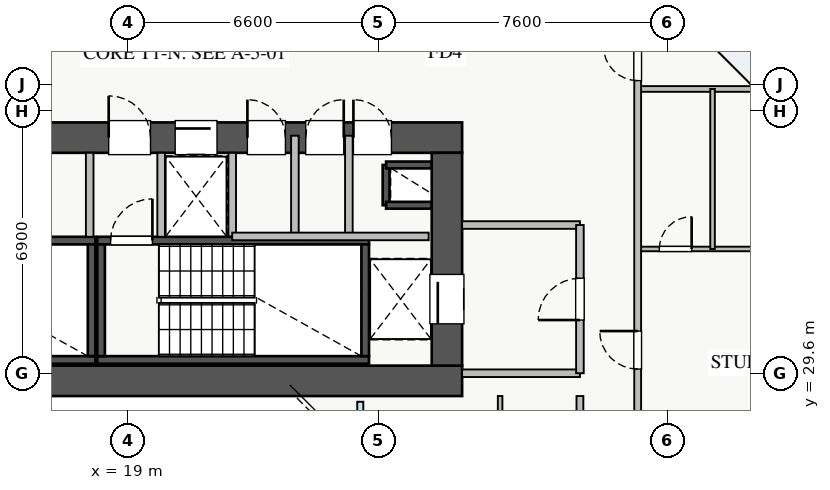
"""IFC4 building model, lengths in metres.
Left out: names, types, materials, properties, quantities, classifications, styles, units other than length and angle.
Written with IfcOpenShell. Run it as: python <this file> out.ifc"""

import sys

from ifc_helpers import new_model, si_unit, direction, frame, frame_2d, origin, place, context, subcontext, project, spatial, rectangle, extrude, source, transform, mapped, element, fill, save


model = new_model("IFC4")
c1 = context("Model", 3, precision=1e-05, world=origin(), true_north=direction((0.0, 1.0)))
c2 = subcontext(c1, "Body", "Model", "MODEL_VIEW")
j1 = project(units=[si_unit("LENGTHUNIT", "METRE"), si_unit("PLANEANGLEUNIT", "RADIAN")], contexts=[c1])
p1 = place(None, origin())
s1 = spatial("IfcSite", under=j1, at=p1, CompositionType="ELEMENT")
p2 = place(p1, origin())
s2 = spatial("IfcBuilding", under=s1, at=p2, CompositionType="ELEMENT")
p3 = place(p2, frame((0.0, 0.0, 82.75)))
s3 = spatial("IfcBuildingStorey", under=s2, at=p3, CompositionType="ELEMENT", Elevation=82.75)
p4 = place(p3, frame((25.8, 34.02, 0.0), z_axis=(0.0, 0.0, 1.0), x_axis=(0.0, 1.0, 0.0)))
e1 = element("IfcWall", 1, at=p4, inside=s3, PredefinedType="SHEAR", context=c2, shape_type="SweptSolid", body=[
    extrude(rectangle(XDim=1.06, YDim=0.18, at=frame_2d((0.53, 0.0))), origin(), (0.0, 0.0, 1.0), 3.07),
])
for number, where, z_axis, x_axis in (
    (2, (25.8, 35.08, 0.0), (0.0, 0.0, 1.0), (1.0, 0.0, 0.0)),
    (3, (25.8, 34.02, 0.0), (0.0, 0.0, 1.0), (1.0, 0.0, 0.0)),
):
    element("IfcWall", number, at=place(p3, frame(where, z_axis=z_axis, x_axis=x_axis)), inside=s3, PredefinedType="SHEAR", context=c2, shape_type="SweptSolid", body=[
        extrude(rectangle(XDim=1.2, YDim=0.18, at=frame_2d((0.6, 0.0))), origin(), (0.0, 0.0, 1.0), 3.07),
    ])
p5 = place(p3, frame((19.88, 33.2, 0.0), z_axis=(0.0, 0.0, 1.0), x_axis=(1.0, 0.0, 0.0)))
e4 = element("IfcWall", 4, at=p5, inside=s3, PredefinedType="SHEAR", context=c2, shape_type="SweptSolid", body=[
    extrude(rectangle(XDim=1.87, YDim=0.18, at=frame_2d((0.935, 0.0))), origin(), (0.0, 0.0, 1.0), 3.07),
])
p6 = place(p3, frame((11.0, 29.95, 0.0), z_axis=(0.0, 0.0, 1.0), x_axis=(1.0, 0.0, 0.0)))
e5 = element("IfcWall", 5, at=p6, inside=s3, PredefinedType="SHEAR", context=c2, shape_type="SweptSolid", body=[
    extrude(rectangle(XDim=7.15, YDim=0.2, at=frame_2d((3.575, 0.0))), origin(), (0.0, 0.0, 1.0), 3.25),
])
p7 = place(p3, frame((11.0, 33.09, 0.0), z_axis=(0.0, 0.0, 1.0), x_axis=(1.0, 0.0, 0.0)))
e6 = element("IfcWall", 6, at=p7, inside=s3, PredefinedType="SHEAR", context=c2, shape_type="SweptSolid", body=[
    extrude(rectangle(XDim=7.15, YDim=0.2, at=frame_2d((3.575, 0.0))), origin(), (0.0, 0.0, 1.0), 3.25),
])
p8 = place(p7, frame((0.35, 0.0, 0.0)))
e7 = element("IfcOpeningElement", 7, at=p8, cuts=e6, PredefinedType="OPENING", context=c2, shape_type="SweptSolid", body=[
    extrude(rectangle(XDim=1.1, YDim=2.05, at=frame_2d((0.55, 1.025))), frame((0.0, 0.11, 0.0), z_axis=(0.0, -1.0, 0.0), x_axis=(1.0, 0.0, 0.0)), (0.0, 0.0, 1.0), 0.22),
])
p9 = place(p3, frame((18.05, 30.05, 0.0), z_axis=(0.0, 0.0, 1.0), x_axis=(0.0, 1.0, 0.0)))
e8 = element("IfcWall", 8, at=p9, inside=s3, PredefinedType="SHEAR", context=c2, shape_type="SweptSolid", body=[
    extrude(rectangle(XDim=2.94, YDim=0.2, at=frame_2d((1.47, 0.0))), origin(), (0.0, 0.0, 1.0), 3.25),
])
p10 = place(p3, frame((18.2, 29.95, 0.0), z_axis=(0.0, 0.0, 1.0), x_axis=(1.0, 0.0, 0.0)))
e9 = element("IfcWall", 9, at=p10, inside=s3, PredefinedType="SHEAR", context=c2, shape_type="SweptSolid", body=[
    extrude(rectangle(XDim=7.15, YDim=0.2, at=frame_2d((3.575, 0.0))), origin(), (0.0, 0.0, 1.0), 3.25),
])
p11 = place(p3, frame((18.2, 33.09, 0.0), z_axis=(0.0, 0.0, 1.0), x_axis=(1.0, 0.0, 0.0)))
e10 = element("IfcWall", 10, at=p11, inside=s3, PredefinedType="SHEAR", context=c2, shape_type="SweptSolid", body=[
    extrude(rectangle(XDim=7.15, YDim=0.2, at=frame_2d((3.575, 0.0))), origin(), (0.0, 0.0, 1.0), 3.25),
])
p12 = place(p11, frame((0.35, 0.0, 0.0)))
e11 = element("IfcOpeningElement", 11, at=p12, cuts=e10, PredefinedType="OPENING", context=c2, shape_type="SweptSolid", body=[
    extrude(rectangle(XDim=1.1, YDim=2.05, at=frame_2d((0.55, 1.025))), frame((0.0, 0.11, 0.0), z_axis=(0.0, -1.0, 0.0), x_axis=(1.0, 0.0, 0.0)), (0.0, 0.0, 1.0), 0.22),
])
for number, where, z_axis, x_axis in (
    (12, (18.3, 30.05, 0.0), (0.0, 0.0, 1.0), (0.0, 1.0, 0.0)),
    (13, (25.25, 30.05, 0.0), (0.0, 0.0, 1.0), (0.0, 1.0, 0.0)),
):
    element("IfcWall", number, at=place(p3, frame(where, z_axis=z_axis, x_axis=x_axis)), inside=s3, PredefinedType="SHEAR", context=c2, shape_type="SweptSolid", body=[
        extrude(rectangle(XDim=2.94, YDim=0.2, at=frame_2d((1.47, 0.0))), origin(), (0.0, 0.0, 1.0), 3.25),
    ])
p13 = place(p3, frame((10.2, 29.4, 0.0), z_axis=(0.0, 0.0, 1.0), x_axis=(1.0, 0.0, 0.0)))
e14 = element("IfcWall", 14, at=p13, inside=s3, PredefinedType="SHEAR", context=c2, shape_type="SweptSolid", body=[
    extrude(rectangle(XDim=17.6, YDim=0.8, at=frame_2d((8.8, 0.0))), origin(), (0.0, 0.0, 1.0), 3.25),
])
p14 = place(p3, frame((10.2, 35.8, 0.0), z_axis=(0.0, 0.0, 1.0), x_axis=(1.0, 0.0, 0.0)))
e15 = element("IfcWall", 15, at=p14, inside=s3, PredefinedType="SHEAR", context=c2, shape_type="SweptSolid", body=[
    extrude(rectangle(XDim=17.6, YDim=0.8, at=frame_2d((8.8, 0.0))), origin(), (0.0, 0.0, 1.0), 3.25),
])
p15 = place(p14, frame((1.15, 0.0, 0.0)))
e16 = element("IfcOpeningElement", 16, at=p15, cuts=e15, PredefinedType="OPENING", context=c2, shape_type="SweptSolid", body=[
    extrude(rectangle(XDim=1.1, YDim=2.05, at=frame_2d((0.55, 1.025))), frame((0.0, 0.41, 0.0), z_axis=(0.0, -1.0, 0.0), x_axis=(1.0, 0.0, 0.0)), (0.0, 0.0, 1.0), 0.82),
])
p16 = place(p14, frame((8.3, 0.0, 0.0)))
e17 = element("IfcOpeningElement", 17, at=p16, cuts=e15, PredefinedType="OPENING", context=c2, shape_type="SweptSolid", body=[
    extrude(rectangle(XDim=1.1, YDim=2.05, at=frame_2d((0.55, 1.025))), frame((0.0, 0.41, 0.0), z_axis=(0.0, -1.0, 0.0), x_axis=(1.0, 0.0, 0.0)), (0.0, 0.0, 1.0), 0.82),
])
p17 = place(p14, frame((10.05, 0.0, 0.0)))
e18 = element("IfcOpeningElement", 18, at=p17, cuts=e15, PredefinedType="OPENING", context=c2, shape_type="SweptSolid", body=[
    extrude(rectangle(XDim=1.1, YDim=2.05, at=frame_2d((0.55, 1.025))), frame((0.0, 0.41, 0.0), z_axis=(0.0, -1.0, 0.0), x_axis=(1.0, 0.0, 0.0)), (0.0, 0.0, 1.0), 0.82),
])
p18 = place(p14, frame((14.74, 0.0, 0.0)))
e19 = element("IfcOpeningElement", 19, at=p18, cuts=e15, PredefinedType="OPENING", context=c2, shape_type="SweptSolid", body=[
    extrude(rectangle(XDim=1.0, YDim=2.05, at=frame_2d((0.5, 1.025))), frame((0.0, 0.41, 0.0), z_axis=(0.0, -1.0, 0.0), x_axis=(1.0, 0.0, 0.0)), (0.0, 0.0, 1.0), 0.82),
])
p19 = place(p14, frame((11.95, 0.0, 0.0)))
e20 = element("IfcOpeningElement", 20, at=p19, cuts=e15, PredefinedType="OPENING", context=c2, shape_type="SweptSolid", body=[
    extrude(rectangle(XDim=1.0, YDim=2.05, at=frame_2d((0.5, 1.025))), frame((0.0, 0.41, 0.0), z_axis=(0.0, -1.0, 0.0), x_axis=(1.0, 0.0, 0.0)), (0.0, 0.0, 1.0), 0.82),
])
p20 = place(p14, frame((13.485, 0.0, 0.0)))
e21 = element("IfcOpeningElement", 21, at=p20, cuts=e15, PredefinedType="OPENING", context=c2, shape_type="SweptSolid", body=[
    extrude(rectangle(XDim=1.0, YDim=2.05, at=frame_2d((0.5, 1.025))), frame((0.0, 0.41, 0.0), z_axis=(0.0, -1.0, 0.0), x_axis=(1.0, 0.0, 0.0)), (0.0, 0.0, 1.0), 0.82),
])
p21 = place(p3, frame((27.4, 29.8, 0.0), z_axis=(0.0, 0.0, 1.0), x_axis=(0.0, 1.0, 0.0)))
e22 = element("IfcWall", 22, at=p21, inside=s3, PredefinedType="SHEAR", context=c2, shape_type="SweptSolid", body=[
    extrude(rectangle(XDim=5.6, YDim=0.8, at=frame_2d((2.8, 0.0))), origin(), (0.0, 0.0, 1.0), 3.25),
])
p22 = place(p21, frame((1.1, 0.0, 0.0)))
e23 = element("IfcOpeningElement", 23, at=p22, cuts=e22, PredefinedType="OPENING", context=c2, shape_type="SweptSolid", body=[
    extrude(rectangle(XDim=1.3, YDim=2.05, at=frame_2d((0.65, 1.025))), frame((0.0, 0.41, 0.0), z_axis=(0.0, -1.0, 0.0), x_axis=(1.0, 0.0, 0.0)), (0.0, 0.0, 1.0), 0.82),
])
for number, where, z_axis, x_axis in (
    (24, (27.8, 29.6, 0.0), (0.0, 0.0, 1.0), (1.0, 0.0, 0.0)),
    (25, (27.8, 33.5, 0.0), (0.0, 0.0, 1.0), (1.0, 0.0, 0.0)),
):
    element("IfcWall", number, at=place(p3, frame(where, z_axis=z_axis, x_axis=x_axis)), inside=s3, PredefinedType="PARTITIONING", context=c2, shape_type="SweptSolid", body=[
        extrude(rectangle(XDim=3.1, YDim=0.2, at=frame_2d((1.55, 0.0))), origin(), (0.0, 0.0, 1.0), 3.07),
    ])
p23 = place(p3, frame((30.9, 29.6, 0.0), z_axis=(0.0, 0.0, 1.0), x_axis=(0.0, 1.0, 0.0)))
e26 = element("IfcWall", 26, at=p23, inside=s3, PredefinedType="PARTITIONING", context=c2, shape_type="SweptSolid", body=[
    extrude(rectangle(XDim=3.9, YDim=0.2, at=frame_2d((1.95, 0.0))), origin(), (0.0, 0.0, 1.0), 3.07),
])
p24 = place(p23, frame((1.4, 0.0, 0.0)))
e27 = element("IfcOpeningElement", 27, at=p24, cuts=e26, PredefinedType="OPENING", context=c2, shape_type="SweptSolid", body=[
    extrude(rectangle(XDim=1.1, YDim=2.05, at=frame_2d((0.55, 1.025))), frame((0.0, 0.11, 0.0), z_axis=(0.0, -1.0, 0.0), x_axis=(1.0, 0.0, 0.0)), (0.0, 0.0, 1.0), 0.22),
])
for number, where, z_axis, x_axis in (
    (28, (18.0, 33.19, 0.0), (0.0, 0.0, 1.0), (0.0, 1.0, 0.0)),
    (29, (19.88, 33.19, 0.0), (0.0, 0.0, 1.0), (0.0, 1.0, 0.0)),
):
    element("IfcWall", number, at=place(p3, frame(where, z_axis=z_axis, x_axis=x_axis)), inside=s3, PredefinedType="PARTITIONING", context=c2, shape_type="SweptSolid", body=[
        extrude(rectangle(XDim=2.21, YDim=0.2, at=frame_2d((1.105, 0.0))), origin(), (0.0, 0.0, 1.0), 3.07),
    ])
p25 = place(p3, frame((24.82, 33.2, 0.0), z_axis=(0.0, 0.0, 1.0), x_axis=(0.0, 1.0, 0.0)))
e30 = element("IfcWall", 30, at=p25, inside=s3, PredefinedType="PARTITIONING", context=c2, shape_type="SweptSolid", body=[
    extrude(rectangle(XDim=2.65, YDim=0.2, at=frame_2d((1.325, 0.0))), origin(), (0.0, 0.0, 1.0), 3.07),
])
p26 = place(p3, frame((21.75, 33.2, 0.0), z_axis=(0.0, 0.0, 1.0), x_axis=(0.0, 1.0, 0.0)))
e31 = element("IfcWall", 31, at=p26, inside=s3, PredefinedType="PARTITIONING", context=c2, shape_type="SweptSolid", body=[
    extrude(rectangle(XDim=2.2, YDim=0.2, at=frame_2d((1.1, 0.0))), origin(), (0.0, 0.0, 1.0), 3.07),
])
p27 = place(p3, frame((23.4, 33.2, 0.0), z_axis=(0.0, 0.0, 1.0), x_axis=(0.0, 1.0, 0.0)))
e32 = element("IfcWall", 32, at=p27, inside=s3, PredefinedType="PARTITIONING", context=c2, shape_type="SweptSolid", body=[
    extrude(rectangle(XDim=2.65, YDim=0.2, at=frame_2d((1.325, 0.0))), origin(), (0.0, 0.0, 1.0), 3.07),
])
p28 = place(p3, frame((21.75, 33.2, 0.0), z_axis=(0.0, 0.0, 1.0), x_axis=(1.0, 0.0, 0.0)))
e33 = element("IfcWall", 33, at=p28, inside=s3, PredefinedType="PARTITIONING", context=c2, shape_type="SweptSolid", body=[
    extrude(rectangle(XDim=5.17, YDim=0.2, at=frame_2d((2.585, 0.0))), origin(), (0.0, 0.0, 1.0), 3.07),
])
p29 = place(p3, frame((32.42, 37.08, 0.0), z_axis=(0.0, 0.0, 1.0), x_axis=(1.0, 0.0, 0.0)))
e34 = element("IfcWall", 34, at=p29, inside=s3, PredefinedType="PARTITIONING", context=c2, shape_type="SweptSolid", body=[
    extrude(rectangle(XDim=5.33, YDim=0.15, at=frame_2d((2.665, 0.0))), origin(), (0.0, 0.0, 1.0), 3.07),
])
p30 = place(p3, frame((32.42, 32.87, 0.0), z_axis=(0.0, 0.0, 1.0), x_axis=(1.0, 0.0, 0.0)))
e35 = element("IfcWall", 35, at=p30, inside=s3, PredefinedType="PLUMBINGWALL", context=c2, shape_type="SweptSolid", body=[
    extrude(rectangle(XDim=5.33, YDim=0.12, at=frame_2d((2.665, 0.0))), origin(), (0.0, 0.0, 1.0), 3.07),
])
p31 = place(p30, frame((0.57, 0.0, 0.0)))
e36 = element("IfcOpeningElement", 36, at=p31, cuts=e35, PredefinedType="OPENING", context=c2, shape_type="SweptSolid", body=[
    extrude(rectangle(XDim=0.85, YDim=2.05, at=frame_2d((0.425, 1.025))), frame((0.0, 0.07, 0.0), z_axis=(0.0, -1.0, 0.0), x_axis=(1.0, 0.0, 0.0)), (0.0, 0.0, 1.0), 0.14),
])
p32 = place(p30, frame((3.19, 0.0, 0.0)))
e37 = element("IfcOpeningElement", 37, at=p32, cuts=e35, PredefinedType="OPENING", context=c2, shape_type="SweptSolid", body=[
    extrude(rectangle(XDim=0.9, YDim=2.05, at=frame_2d((0.45, 1.025))), frame((0.0, 0.07, 0.0), z_axis=(0.0, -1.0, 0.0), x_axis=(1.0, 0.0, 0.0)), (0.0, 0.0, 1.0), 0.14),
])
p33 = place(p3, frame((34.39, 32.87, 0.0), z_axis=(0.0, 0.0, 1.0), x_axis=(0.0, 1.0, 0.0)))
e38 = element("IfcWall", 38, at=p33, inside=s3, PredefinedType="PLUMBINGWALL", context=c2, shape_type="SweptSolid", body=[
    extrude(rectangle(XDim=4.21, YDim=0.12, at=frame_2d((2.105, 0.0))), origin(), (0.0, 0.0, 1.0), 3.07),
])
p34 = place(p3, frame((32.42, 7.21, 0.0), z_axis=(0.0, 0.0, 1.0), x_axis=(0.0, 1.0, 0.0)))
e39 = element("IfcWall", 39, at=p34, inside=s3, PredefinedType="PARTITIONING", context=c2, shape_type="SweptSolid", body=[
    extrude(rectangle(XDim=31.23, YDim=0.18, at=frame_2d((15.615, 0.0))), origin(), (0.0, 0.0, 1.0), 2.865),
])
p35 = place(p34, frame((30.09, 0.0, 0.0)))
e40 = element("IfcOpeningElement", 40, at=p35, cuts=e39, PredefinedType="OPENING", context=c2, shape_type="SweptSolid", body=[
    extrude(rectangle(XDim=0.9, YDim=2.05, at=frame_2d((0.45, 1.025))), frame((0.0, 0.1, 0.0), z_axis=(0.0, -1.0, 0.0), x_axis=(1.0, 0.0, 0.0)), (0.0, 0.0, 1.0), 0.2),
])
p36 = place(p34, frame((0.415, 0.0, 0.0)))
e41 = element("IfcOpeningElement", 41, at=p36, cuts=e39, PredefinedType="OPENING", context=c2, shape_type="SweptSolid", body=[
    extrude(rectangle(XDim=0.9, YDim=2.05, at=frame_2d((0.45, 1.025))), frame((0.0, 0.1, 0.0), z_axis=(0.0, -1.0, 0.0), x_axis=(1.0, 0.0, 0.0)), (0.0, 0.0, 1.0), 0.2),
])
p37 = place(p34, frame((5.675, 0.0, 0.0)))
e42 = element("IfcOpeningElement", 42, at=p37, cuts=e39, PredefinedType="OPENING", context=c2, shape_type="SweptSolid", body=[
    extrude(rectangle(XDim=1.0, YDim=2.05, at=frame_2d((0.5, 1.025))), frame((0.0, 0.1, 0.0), z_axis=(0.0, -1.0, 0.0), x_axis=(1.0, 0.0, 0.0)), (0.0, 0.0, 1.0), 0.2),
])
p38 = place(p34, frame((12.575, 0.0, 0.0)))
e43 = element("IfcOpeningElement", 43, at=p38, cuts=e39, PredefinedType="OPENING", context=c2, shape_type="SweptSolid", body=[
    extrude(rectangle(XDim=1.0, YDim=2.05, at=frame_2d((0.5, 1.025))), frame((0.0, 0.1, 0.0), z_axis=(0.0, -1.0, 0.0), x_axis=(1.0, 0.0, 0.0)), (0.0, 0.0, 1.0), 0.2),
])
p39 = place(p34, frame((22.5, 0.0, 0.0)))
e44 = element("IfcOpeningElement", 44, at=p39, cuts=e39, PredefinedType="OPENING", context=c2, shape_type="SweptSolid", body=[
    extrude(rectangle(XDim=1.0, YDim=2.05, at=frame_2d((0.5, 1.025))), frame((0.0, 0.1, 0.0), z_axis=(0.0, -1.0, 0.0), x_axis=(1.0, 0.0, 0.0)), (0.0, 0.0, 1.0), 0.2),
])
p40 = place(p3, frame((28.8, 26.39, 0.0), z_axis=(0.0, 0.0, 1.0), x_axis=(0.0, 1.0, 0.0)))
e45 = element("IfcWall", 45, at=p40, inside=s3, PredefinedType="PLUMBINGWALL", context=c2, shape_type="SweptSolid", body=[
    extrude(rectangle(XDim=2.61, YDim=0.12, at=frame_2d((1.305, 0.0))), origin(), (0.0, 0.0, 1.0), 3.07),
])
p41 = place(p3, frame((30.9, 17.0, 0.0), z_axis=(0.0, 0.0, 1.0), x_axis=(0.0, 1.0, 0.0)))
e46 = element("IfcWall", 46, at=p41, inside=s3, PredefinedType="PARTITIONING", context=c2, shape_type="SweptSolid", body=[
    extrude(rectangle(XDim=12.0, YDim=0.18, at=frame_2d((6.0, 0.0))), origin(), (0.0, 0.0, 1.0), 3.07),
])
p42 = place(p41, frame((1.02, 0.0, 0.0)))
e47 = element("IfcOpeningElement", 47, at=p42, cuts=e46, PredefinedType="OPENING", context=c2, shape_type="SweptSolid", body=[
    extrude(rectangle(XDim=1.0, YDim=2.05, at=frame_2d((0.5, 1.025))), frame((0.0, 0.1, 0.0), z_axis=(0.0, -1.0, 0.0), x_axis=(1.0, 0.0, 0.0)), (0.0, 0.0, 1.0), 0.2),
])
p43 = place(p41, frame((7.17, 0.0, 0.0)))
e48 = element("IfcOpeningElement", 48, at=p43, cuts=e46, PredefinedType="OPENING", context=c2, shape_type="SweptSolid", body=[
    extrude(rectangle(XDim=1.0, YDim=2.05, at=frame_2d((0.5, 1.025))), frame((0.0, 0.1, 0.0), z_axis=(0.0, -1.0, 0.0), x_axis=(1.0, 0.0, 0.0)), (0.0, 0.0, 1.0), 0.2),
])
m1 = source(origin(), c2, "Body", "SweptSolid", [
    extrude(rectangle(XDim=1.3, YDim=2.05, at=frame_2d((0.65, 1.025))), frame((0.0, 0.025, 0.0), z_axis=(0.0, -1.0, 0.0), x_axis=(1.0, 0.0, 0.0)), (0.0, 0.0, 1.0), 0.05),
])
p44 = place(p22, origin())
e49 = element("IfcDoor", 49, at=p44, inside=s3, OperationType="SLIDING_TO_LEFT", PredefinedType="DOOR", context=c2, shape_type="MappedRepresentation", body=[
    mapped(m1, transform((0.0, 0.0, 0.0), x_axis=(1.0, 0.0, 0.0), y_axis=(0.0, 1.0, 0.0), z_axis=(0.0, 0.0, 1.0), scale=1.0)),
])
fill(e23, e49)
m2 = source(origin(), c2, "Body", "SweptSolid", [
    extrude(rectangle(XDim=1.1, YDim=2.05, at=frame_2d((0.55, 1.025))), frame((0.0, 0.025, 0.0), z_axis=(0.0, -1.0, 0.0), x_axis=(1.0, 0.0, 0.0)), (0.0, 0.0, 1.0), 0.05),
])
p45 = place(p16, origin())
e50 = element("IfcDoor", 50, at=p45, inside=s3, OperationType="SINGLE_SWING_LEFT", PredefinedType="DOOR", context=c2, shape_type="MappedRepresentation", body=[
    mapped(m2, transform((0.0, 0.0, 0.0), x_axis=(1.0, 0.0, 0.0), y_axis=(0.0, 1.0, 0.0), z_axis=(0.0, 0.0, 1.0), scale=1.0)),
])
fill(e17, e50)
p46 = place(p12, origin())
e51 = element("IfcDoor", 51, at=p46, inside=s3, OperationType="SINGLE_SWING_RIGHT", PredefinedType="DOOR", context=c2, shape_type="MappedRepresentation", body=[
    mapped(m2, transform((0.0, 0.0, 0.0), x_axis=(1.0, 0.0, 0.0), y_axis=(0.0, 1.0, 0.0), z_axis=(0.0, 0.0, 1.0), scale=1.0)),
])
fill(e11, e51)
p47 = place(p17, origin())
e52 = element("IfcDoor", 52, at=p47, inside=s3, OperationType="SLIDING_TO_LEFT", PredefinedType="DOOR", context=c2, shape_type="MappedRepresentation", body=[
    mapped(m2, transform((0.0, 0.0, 0.0), x_axis=(1.0, 0.0, 0.0), y_axis=(0.0, 1.0, 0.0), z_axis=(0.0, 0.0, 1.0), scale=1.0)),
])
fill(e18, e52)
m3 = source(origin(), c2, "Body", "SweptSolid", [
    extrude(rectangle(XDim=1.0, YDim=2.05, at=frame_2d((0.5, 1.025))), frame((0.0, 0.025, 0.0), z_axis=(0.0, -1.0, 0.0), x_axis=(1.0, 0.0, 0.0)), (0.0, 0.0, 1.0), 0.05),
])
p48 = place(p18, origin())
e53 = element("IfcDoor", 53, at=p48, inside=s3, OperationType="SINGLE_SWING_LEFT", PredefinedType="DOOR", context=c2, shape_type="MappedRepresentation", body=[
    mapped(m3, transform((0.0, 0.0, 0.0), x_axis=(1.0, 0.0, 0.0), y_axis=(0.0, 1.0, 0.0), z_axis=(0.0, 0.0, 1.0), scale=1.0)),
])
fill(e19, e53)
p49 = place(p19, origin())
e54 = element("IfcDoor", 54, at=p49, inside=s3, OperationType="SINGLE_SWING_LEFT", PredefinedType="DOOR", context=c2, shape_type="MappedRepresentation", body=[
    mapped(m3, transform((0.0, 0.0, 0.0), x_axis=(1.0, 0.0, 0.0), y_axis=(0.0, 1.0, 0.0), z_axis=(0.0, 0.0, 1.0), scale=1.0)),
])
fill(e20, e54)
p50 = place(p20, origin())
e55 = element("IfcDoor", 55, at=p50, inside=s3, OperationType="SINGLE_SWING_RIGHT", PredefinedType="DOOR", context=c2, shape_type="MappedRepresentation", body=[
    mapped(m3, transform((0.0, 0.0, 0.0), x_axis=(1.0, 0.0, 0.0), y_axis=(0.0, 1.0, 0.0), z_axis=(0.0, 0.0, 1.0), scale=1.0)),
])
fill(e21, e55)
p51 = place(p24, origin())
e56 = element("IfcDoor", 56, at=p51, inside=s3, OperationType="SINGLE_SWING_LEFT", PredefinedType="DOOR", context=c2, shape_type="MappedRepresentation", body=[
    mapped(m2, transform((0.0, 0.0, 0.0), x_axis=(1.0, 0.0, 0.0), y_axis=(0.0, 1.0, 0.0), z_axis=(0.0, 0.0, 1.0), scale=1.0)),
])
fill(e27, e56)
m4 = source(origin(), c2, "Body", "SweptSolid", [
    extrude(rectangle(XDim=0.85, YDim=2.05, at=frame_2d((0.425, 1.025))), frame((0.0, 0.025, 0.0), z_axis=(0.0, -1.0, 0.0), x_axis=(1.0, 0.0, 0.0)), (0.0, 0.0, 1.0), 0.05),
])
p52 = place(p31, origin())
e57 = element("IfcDoor", 57, at=p52, inside=s3, OperationType="SINGLE_SWING_RIGHT", PredefinedType="DOOR", context=c2, shape_type="MappedRepresentation", body=[
    mapped(m4, transform((0.0, 0.0, 0.0), x_axis=(1.0, 0.0, 0.0), y_axis=(0.0, 1.0, 0.0), z_axis=(0.0, 0.0, 1.0), scale=1.0)),
])
fill(e36, e57)
m5 = source(origin(), c2, "Body", "SweptSolid", [
    extrude(rectangle(XDim=0.9, YDim=2.05, at=frame_2d((0.45, 1.025))), frame((0.0, 0.025, 0.0), z_axis=(0.0, -1.0, 0.0), x_axis=(1.0, 0.0, 0.0)), (0.0, 0.0, 1.0), 0.05),
])
p53 = place(p35, origin())
e58 = element("IfcDoor", 58, at=p53, inside=s3, OperationType="SINGLE_SWING_RIGHT", PredefinedType="DOOR", context=c2, shape_type="MappedRepresentation", body=[
    mapped(m5, transform((0.0, 0.0, 0.0), x_axis=(1.0, 0.0, 0.0), y_axis=(0.0, 1.0, 0.0), z_axis=(0.0, 0.0, 1.0), scale=1.0)),
])
fill(e40, e58)
p54 = place(p39, origin())
e59 = element("IfcDoor", 59, at=p54, inside=s3, OperationType="SINGLE_SWING_RIGHT", PredefinedType="DOOR", context=c2, shape_type="MappedRepresentation", body=[
    mapped(m3, transform((0.0, 0.0, 0.0), x_axis=(1.0, 0.0, 0.0), y_axis=(0.0, 1.0, 0.0), z_axis=(0.0, 0.0, 1.0), scale=1.0)),
])
fill(e44, e59)
save(model, sys.argv[1])
